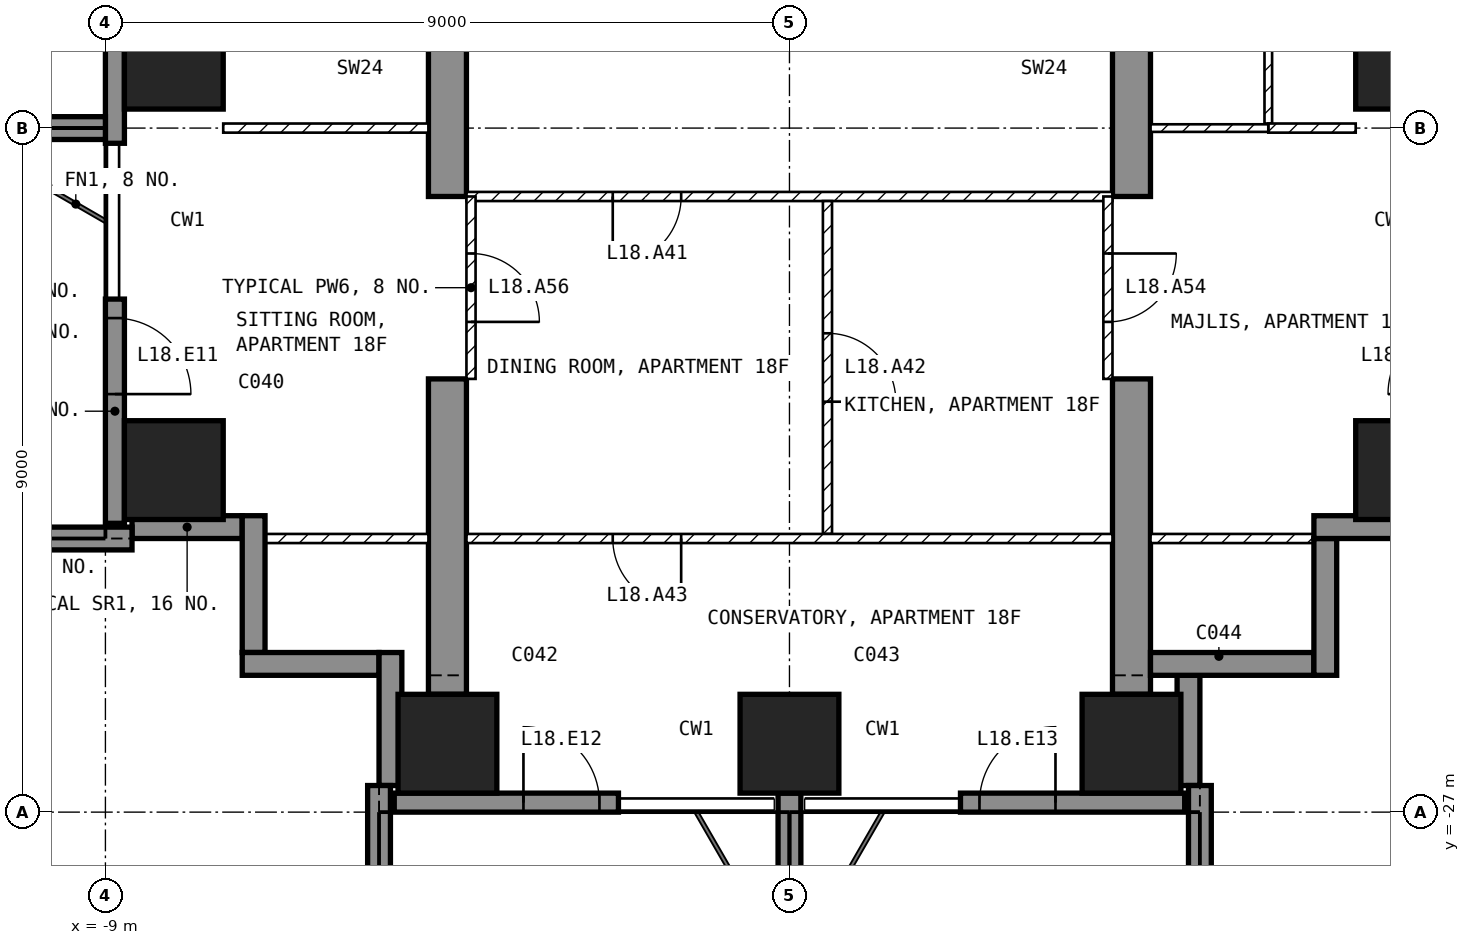
"""IFC4 building model, lengths in metres.
Left out: names, types, materials, properties, quantities, classifications, styles, units other than length and angle.
Written with IfcOpenShell. Run it as: python <this file> out.ifc"""

import sys

from ifc_helpers import new_model, si_unit, direction, frame, frame_2d, origin, origin_2d, place, context, subcontext, project, spatial, polyline, rectangle, outline, extrude, element, fill, save


model = new_model("IFC4")
c1 = context("Model", 3, precision=1e-05, world=origin(), true_north=direction((0.0, 1.0)))
c2 = subcontext(c1, "Body", "Model", "MODEL_VIEW")
j1 = project(units=[si_unit("LENGTHUNIT", "METRE"), si_unit("PLANEANGLEUNIT", "RADIAN")], contexts=[c1])
p1 = place(None, origin())
s1 = spatial("IfcSite", under=j1, at=p1, CompositionType="ELEMENT")
p2 = place(p1, origin())
s2 = spatial("IfcBuilding", under=s1, at=p2, CompositionType="ELEMENT")
p3 = place(p2, frame((0.0, 0.0, 82.0)))
s3 = spatial("IfcBuildingStorey", under=s2, at=p3, CompositionType="ELEMENT", Elevation=82.0)
for number, where, z_axis, x_axis in (
    (1, (-8.1, -22.5, -0.25), (0.0, 0.0, 1.0), (1.0, 0.0, 0.0)),
    (2, (-8.1, -17.1, -0.25), (0.0, 0.0, 1.0), (1.0, 0.0, 0.0)),
    (3, (-4.5, -26.1, -0.25), (0.0, 0.0, 1.0), (1.0, 0.0, 0.0)),
    (4, (0.0, -26.1, -0.25), (0.0, 0.0, 1.0), (1.0, 0.0, 0.0)),
    (5, (4.5, -26.1, -0.25), (0.0, 0.0, 1.0), (1.0, 0.0, 0.0)),
    (6, (8.1, -22.5, -0.25), (0.0, 0.0, 1.0), (1.0, 0.0, 0.0)),
    (7, (8.1, -17.1, -0.25), (0.0, 0.0, 1.0), (1.0, 0.0, 0.0)),
):
    element("IfcColumn", number, at=place(p3, frame(where, z_axis=z_axis, x_axis=x_axis)), inside=s3, PredefinedType="COLUMN", context=c2, shape_type="SweptSolid", body=[
        extrude(rectangle(XDim=1.3, YDim=1.3, at=origin_2d()), origin(), (0.0, 0.0, 1.0), 3.5),
    ])
for number, where, z_axis, x_axis in (
    (8, (-4.75, -25.45, -0.25), (1.0, 0.0, 0.0), (0.0, 1.0, 0.0)),
    (9, (4.25, -25.45, -0.25), (1.0, 0.0, 0.0), (0.0, 1.0, 0.0)),
):
    element("IfcWall", number, at=place(p3, frame(where, z_axis=z_axis, x_axis=x_axis)), inside=s3, PredefinedType="SHEAR", context=c2, shape_type="SweptSolid", body=[
        extrude(outline(polyline([(0.0, 0.0), (4.15, 0.0), (4.15, 2.65), (6.55, 2.65), (6.55, 0.0), (11.95, 0.0), (11.95, 2.65), (14.35, 2.65), (14.35, 0.0), (16.45, 0.0), (16.45, 3.5), (0.0, 3.5), (0.0, 0.0)])), origin(), (0.0, 0.0, 1.0), 0.5),
    ])
p4 = place(p3, frame((-8.875, -14.65, 0.0), z_axis=(0.0, 0.0, 1.0), x_axis=(0.0, -1.0, 0.0)))
e10 = element("IfcWall", 10, at=p4, inside=s3, PredefinedType="SOLIDWALL", context=c2, shape_type="SweptSolid", body=[
    extrude(rectangle(XDim=3.55, YDim=0.25, at=frame_2d((1.775, 0.0))), origin(), (0.0, 0.0, 1.0), 3.25),
])
p5 = place(p4, frame((0.25, 0.0, 0.0)))
e11 = element("IfcOpeningElement", 11, at=p5, cuts=e10, PredefinedType="OPENING", context=c2, shape_type="SweptSolid", body=[
    extrude(rectangle(XDim=1.2, YDim=2.4, at=frame_2d((0.6, 1.2))), frame((0.0, 0.135, 0.0), z_axis=(0.0, -1.0, 0.0), x_axis=(1.0, 0.0, 0.0)), (0.0, 0.0, 1.0), 0.27),
])
p6 = place(p3, frame((-8.875, -20.25, 0.0), z_axis=(0.0, 0.0, 1.0), x_axis=(0.0, -1.0, 0.0)))
e12 = element("IfcWall", 12, at=p6, inside=s3, PredefinedType="SOLIDWALL", context=c2, shape_type="SweptSolid", body=[
    extrude(rectangle(XDim=2.95, YDim=0.25, at=frame_2d((1.475, 0.0))), origin(), (0.0, 0.0, 1.0), 3.25),
])
p7 = place(p6, frame((0.25, 0.0, 0.0)))
e13 = element("IfcOpeningElement", 13, at=p7, cuts=e12, PredefinedType="OPENING", context=c2, shape_type="SweptSolid", body=[
    extrude(rectangle(XDim=1.0, YDim=2.4, at=frame_2d((0.5, 1.2))), frame((0.0, 0.135, 0.0), z_axis=(0.0, -1.0, 0.0), x_axis=(1.0, 0.0, 0.0)), (0.0, 0.0, 1.0), 0.27),
])
p8 = place(p3, frame((-5.2, -26.875, 0.0), z_axis=(0.0, 0.0, 1.0), x_axis=(1.0, 0.0, 0.0)))
e14 = element("IfcWall", 14, at=p8, inside=s3, PredefinedType="SOLIDWALL", context=c2, shape_type="SweptSolid", body=[
    extrude(rectangle(XDim=2.95, YDim=0.25, at=frame_2d((1.475, 0.0))), origin(), (0.0, 0.0, 1.0), 3.25),
])
p9 = place(p8, frame((1.7, 0.0, 0.0)))
e15 = element("IfcOpeningElement", 15, at=p9, cuts=e14, PredefinedType="OPENING", context=c2, shape_type="SweptSolid", body=[
    extrude(rectangle(XDim=1.0, YDim=2.4, at=frame_2d((0.5, 1.2))), frame((0.0, 0.135, 0.0), z_axis=(0.0, -1.0, 0.0), x_axis=(1.0, 0.0, 0.0)), (0.0, 0.0, 1.0), 0.27),
])
p10 = place(p3, frame((2.25, -26.875, 0.0), z_axis=(0.0, 0.0, 1.0), x_axis=(1.0, 0.0, 0.0)))
e16 = element("IfcWall", 16, at=p10, inside=s3, PredefinedType="SOLIDWALL", context=c2, shape_type="SweptSolid", body=[
    extrude(rectangle(XDim=2.95, YDim=0.25, at=frame_2d((1.475, 0.0))), origin(), (0.0, 0.0, 1.0), 3.25),
])
p11 = place(p10, frame((0.25, 0.0, 0.0)))
e17 = element("IfcOpeningElement", 17, at=p11, cuts=e16, PredefinedType="OPENING", context=c2, shape_type="SweptSolid", body=[
    extrude(rectangle(XDim=1.0, YDim=2.4, at=frame_2d((0.5, 1.2))), frame((0.0, 0.135, 0.0), z_axis=(0.0, -1.0, 0.0), x_axis=(1.0, 0.0, 0.0)), (0.0, 0.0, 1.0), 0.27),
])
p12 = place(p3, frame((5.25, -26.65, 0.0), z_axis=(0.0, 0.0, 1.0), x_axis=(0.0, 1.0, 0.0)))
e18 = element("IfcWall", 18, at=p12, inside=s3, PredefinedType="SOLIDWALL", context=c2, shape_type="SweptSolid", body=[
    extrude(rectangle(XDim=1.45, YDim=0.3, at=frame_2d((0.725, 0.0))), origin(), (0.0, 0.0, 1.0), 3.25),
])
p13 = place(p3, frame((4.75, -25.05, 0.0), z_axis=(0.0, 0.0, 1.0), x_axis=(1.0, 0.0, 0.0)))
e19 = element("IfcWall", 19, at=p13, inside=s3, PredefinedType="SOLIDWALL", context=c2, shape_type="SweptSolid", body=[
    extrude(rectangle(XDim=2.15, YDim=0.3, at=frame_2d((1.075, 0.0))), origin(), (0.0, 0.0, 1.0), 3.25),
])
p14 = place(p3, frame((7.05, -25.2, 0.0), z_axis=(0.0, 0.0, 1.0), x_axis=(0.0, 1.0, 0.0)))
e20 = element("IfcWall", 20, at=p14, inside=s3, PredefinedType="SOLIDWALL", context=c2, shape_type="SweptSolid", body=[
    extrude(rectangle(XDim=1.8, YDim=0.3, at=frame_2d((0.9, 0.0))), origin(), (0.0, 0.0, 1.0), 3.25),
])
p15 = place(p3, frame((6.9, -23.25, 0.0), z_axis=(0.0, 0.0, 1.0), x_axis=(1.0, 0.0, 0.0)))
e21 = element("IfcWall", 21, at=p15, inside=s3, PredefinedType="SOLIDWALL", context=c2, shape_type="SweptSolid", body=[
    extrude(rectangle(XDim=1.75, YDim=0.3, at=frame_2d((0.875, 0.0))), origin(), (0.0, 0.0, 1.0), 3.25),
])
p16 = place(p3, frame((-8.65, -23.25, 0.0), z_axis=(0.0, 0.0, 1.0), x_axis=(1.0, 0.0, 0.0)))
e22 = element("IfcWall", 22, at=p16, inside=s3, PredefinedType="SOLIDWALL", context=c2, shape_type="SweptSolid", body=[
    extrude(rectangle(XDim=1.45, YDim=0.3, at=frame_2d((0.725, 0.0))), origin(), (0.0, 0.0, 1.0), 3.25),
])
p17 = place(p3, frame((-7.05, -23.1, 0.0), z_axis=(0.0, 0.0, 1.0), x_axis=(0.0, -1.0, 0.0)))
e23 = element("IfcWall", 23, at=p17, inside=s3, PredefinedType="SOLIDWALL", context=c2, shape_type="SweptSolid", body=[
    extrude(rectangle(XDim=1.8, YDim=0.3, at=frame_2d((0.9, 0.0))), origin(), (0.0, 0.0, 1.0), 3.25),
])
p18 = place(p3, frame((-7.2, -25.05, 0.0), z_axis=(0.0, 0.0, 1.0), x_axis=(1.0, 0.0, 0.0)))
e24 = element("IfcWall", 24, at=p18, inside=s3, PredefinedType="SOLIDWALL", context=c2, shape_type="SweptSolid", body=[
    extrude(rectangle(XDim=1.8, YDim=0.3, at=frame_2d((0.9, 0.0))), origin(), (0.0, 0.0, 1.0), 3.25),
])
p19 = place(p3, frame((-5.25, -24.9, 0.0), z_axis=(0.0, 0.0, 1.0), x_axis=(0.0, -1.0, 0.0)))
e25 = element("IfcWall", 25, at=p19, inside=s3, PredefinedType="SOLIDWALL", context=c2, shape_type="SweptSolid", body=[
    extrude(rectangle(XDim=1.75, YDim=0.3, at=frame_2d((0.875, 0.0))), origin(), (0.0, 0.0, 1.0), 3.25),
])
p20 = place(p3, frame((-8.65, -23.4, 0.0), z_axis=(0.0, 0.0, 1.0), x_axis=(-1.0, 0.0, 0.0)))
e26 = element("IfcWall", 26, at=p20, inside=s3, PredefinedType="SOLIDWALL", context=c2, shape_type="SweptSolid", body=[
    extrude(rectangle(XDim=3.05, YDim=0.3, at=frame_2d((1.525, 0.0))), origin(), (0.0, 0.0, 1.0), 3.25),
])
p21 = place(p3, frame((-9.0, -18.0, 0.0), z_axis=(0.0, 0.0, 1.0), x_axis=(-1.0, 0.0, 0.0)))
e27 = element("IfcWall", 27, at=p21, inside=s3, PredefinedType="SOLIDWALL", context=c2, shape_type="SweptSolid", body=[
    extrude(rectangle(XDim=2.7, YDim=0.3, at=frame_2d((1.35, 0.0))), origin(), (0.0, 0.0, 1.0), 3.25),
])
p22 = place(p3, frame((-5.4, -26.65, 0.0), z_axis=(0.0, 0.0, 1.0), x_axis=(0.0, -1.0, 0.0)))
e28 = element("IfcWall", 28, at=p22, inside=s3, PredefinedType="SOLIDWALL", context=c2, shape_type="SweptSolid", body=[
    extrude(rectangle(XDim=3.05, YDim=0.3, at=frame_2d((1.525, 0.0))), origin(), (0.0, 0.0, 1.0), 3.25),
])
p23 = place(p3, frame((0.0, -26.75, 0.0), z_axis=(0.0, 0.0, 1.0), x_axis=(0.0, -1.0, 0.0)))
e29 = element("IfcWall", 29, at=p23, inside=s3, PredefinedType="SOLIDWALL", context=c2, shape_type="SweptSolid", body=[
    extrude(rectangle(XDim=2.95, YDim=0.3, at=frame_2d((1.475, 0.0))), origin(), (0.0, 0.0, 1.0), 3.25),
])
p24 = place(p3, frame((5.4, -26.65, 0.0), z_axis=(0.0, 0.0, 1.0), x_axis=(0.0, -1.0, 0.0)))
e30 = element("IfcWall", 30, at=p24, inside=s3, PredefinedType="SOLIDWALL", context=c2, shape_type="SweptSolid", body=[
    extrude(rectangle(XDim=3.05, YDim=0.3, at=frame_2d((1.525, 0.0))), origin(), (0.0, 0.0, 1.0), 3.25),
])
p25 = place(p3, frame((4.25, -18.9, 0.0), z_axis=(0.0, 0.0, 1.0), x_axis=(-1.0, 0.0, 0.0)))
e31 = element("IfcWall", 31, at=p25, inside=s3, PredefinedType="PARTITIONING", context=c2, shape_type="SweptSolid", body=[
    extrude(rectangle(XDim=8.5, YDim=0.12, at=frame_2d((4.25, 0.0))), origin(), (0.0, 0.0, 1.0), 3.25),
])
p26 = place(p25, frame((5.675, 0.0, 0.0)))
e32 = element("IfcOpeningElement", 32, at=p26, cuts=e31, PredefinedType="OPENING", context=c2, shape_type="SweptSolid", body=[
    extrude(rectangle(XDim=0.9, YDim=2.1, at=frame_2d((0.45, 1.05))), frame((0.0, 0.07, 0.0), z_axis=(0.0, -1.0, 0.0), x_axis=(1.0, 0.0, 0.0)), (0.0, 0.0, 1.0), 0.14),
])
p27 = place(p3, frame((0.5, -18.96, 0.0), z_axis=(0.0, 0.0, 1.0), x_axis=(0.0, -1.0, 0.0)))
e33 = element("IfcWall", 33, at=p27, inside=s3, PredefinedType="PARTITIONING", context=c2, shape_type="SweptSolid", body=[
    extrude(rectangle(XDim=4.38, YDim=0.12, at=frame_2d((2.19, 0.0))), origin(), (0.0, 0.0, 1.0), 3.25),
])
p28 = place(p27, frame((1.74, 0.0, 0.0)))
e34 = element("IfcOpeningElement", 34, at=p28, cuts=e33, PredefinedType="OPENING", context=c2, shape_type="SweptSolid", body=[
    extrude(rectangle(XDim=0.9, YDim=2.1, at=frame_2d((0.45, 1.05))), frame((0.0, 0.07, 0.0), z_axis=(0.0, -1.0, 0.0), x_axis=(1.0, 0.0, 0.0)), (0.0, 0.0, 1.0), 0.14),
])
p29 = place(p3, frame((4.25, -23.4, 0.0), z_axis=(0.0, 0.0, 1.0), x_axis=(-1.0, 0.0, 0.0)))
e35 = element("IfcWall", 35, at=p29, inside=s3, PredefinedType="PARTITIONING", context=c2, shape_type="SweptSolid", body=[
    extrude(rectangle(XDim=8.5, YDim=0.12, at=frame_2d((4.25, 0.0))), origin(), (0.0, 0.0, 1.0), 3.25),
])
p30 = place(p29, frame((5.675, 0.0, 0.0)))
e36 = element("IfcOpeningElement", 36, at=p30, cuts=e35, PredefinedType="OPENING", context=c2, shape_type="SweptSolid", body=[
    extrude(rectangle(XDim=0.9, YDim=2.1, at=frame_2d((0.45, 1.05))), frame((0.0, 0.07, 0.0), z_axis=(0.0, -1.0, 0.0), x_axis=(1.0, 0.0, 0.0)), (0.0, 0.0, 1.0), 0.14),
])
p31 = place(p3, frame((6.3, -17.94, 0.0), z_axis=(0.0, 0.0, 1.0), x_axis=(0.0, 1.0, 0.0)))
e37 = element("IfcWall", 37, at=p31, inside=s3, PredefinedType="PARTITIONING", context=c2, shape_type="SweptSolid", body=[
    extrude(rectangle(XDim=3.49, YDim=0.1, at=frame_2d((1.745, 0.0))), origin(), (0.0, 0.0, 1.0), 3.25),
])
p32 = place(p31, frame((1.87, 0.0, 0.0)))
e38 = element("IfcOpeningElement", 38, at=p32, cuts=e37, PredefinedType="OPENING", context=c2, shape_type="SweptSolid", body=[
    extrude(rectangle(XDim=0.85, YDim=2.1, at=frame_2d((0.425, 1.05))), frame((0.0, 0.06, 0.0), z_axis=(0.0, -1.0, 0.0), x_axis=(1.0, 0.0, 0.0)), (0.0, 0.0, 1.0), 0.12),
])
p33 = place(p3, frame((7.45, -18.0, 0.0), z_axis=(0.0, 0.0, 1.0), x_axis=(-1.0, 0.0, 0.0)))
e39 = element("IfcWall", 39, at=p33, inside=s3, PredefinedType="PARTITIONING", context=c2, shape_type="SweptSolid", body=[
    extrude(rectangle(XDim=1.15, YDim=0.12, at=frame_2d((0.575, 0.0))), origin(), (0.0, 0.0, 1.0), 3.25),
])
p34 = place(p3, frame((6.3, -18.0, 0.0), z_axis=(0.0, 0.0, 1.0), x_axis=(-1.0, 0.0, 0.0)))
e40 = element("IfcWall", 40, at=p34, inside=s3, PredefinedType="PARTITIONING", context=c2, shape_type="SweptSolid", body=[
    extrude(rectangle(XDim=1.55, YDim=0.1, at=frame_2d((0.775, 0.0))), origin(), (0.0, 0.0, 1.0), 3.25),
])
p35 = place(p3, frame((7.12, -23.4, 0.0), z_axis=(0.0, 0.0, 1.0), x_axis=(-1.0, 0.0, 0.0)))
e41 = element("IfcWall", 41, at=p35, inside=s3, PredefinedType="PARTITIONING", context=c2, shape_type="SweptSolid", body=[
    extrude(rectangle(XDim=2.37, YDim=0.12, at=frame_2d((1.185, 0.0))), origin(), (0.0, 0.0, 1.0), 3.25),
])
p36 = place(p3, frame((-4.75, -18.0, 0.0), z_axis=(0.0, 0.0, 1.0), x_axis=(-1.0, 0.0, 0.0)))
e42 = element("IfcWall", 42, at=p36, inside=s3, PredefinedType="PARTITIONING", context=c2, shape_type="SweptSolid", body=[
    extrude(rectangle(XDim=2.7, YDim=0.12, at=frame_2d((1.35, 0.0))), origin(), (0.0, 0.0, 1.0), 3.25),
])
p37 = place(p3, frame((-4.75, -23.4, 0.0), z_axis=(0.0, 0.0, 1.0), x_axis=(-1.0, 0.0, 0.0)))
e43 = element("IfcWall", 43, at=p37, inside=s3, PredefinedType="PARTITIONING", context=c2, shape_type="SweptSolid", body=[
    extrude(rectangle(XDim=2.37, YDim=0.12, at=frame_2d((1.185, 0.0))), origin(), (0.0, 0.0, 1.0), 3.25),
])
p38 = place(p3, frame((4.19, -18.9, 0.0), z_axis=(0.0, 0.0, 1.0), x_axis=(0.0, -1.0, 0.0)))
e44 = element("IfcWall", 44, at=p38, inside=s3, PredefinedType="PARTITIONING", context=c2, shape_type="SweptSolid", body=[
    extrude(rectangle(XDim=2.4, YDim=0.12, at=frame_2d((1.2, 0.0))), origin(), (0.0, 0.0, 1.0), 2.4),
])
p39 = place(p38, frame((0.75, 0.0, 0.0)))
e45 = element("IfcOpeningElement", 45, at=p39, cuts=e44, PredefinedType="OPENING", context=c2, shape_type="SweptSolid", body=[
    extrude(rectangle(XDim=0.9, YDim=2.1, at=frame_2d((0.45, 1.05))), frame((0.0, 0.07, 0.0), z_axis=(0.0, -1.0, 0.0), x_axis=(1.0, 0.0, 0.0)), (0.0, 0.0, 1.0), 0.14),
])
p40 = place(p3, frame((-4.19, -18.9, 0.0), z_axis=(0.0, 0.0, 1.0), x_axis=(0.0, -1.0, 0.0)))
e46 = element("IfcWall", 46, at=p40, inside=s3, PredefinedType="PARTITIONING", context=c2, shape_type="SweptSolid", body=[
    extrude(rectangle(XDim=2.4, YDim=0.12, at=frame_2d((1.2, 0.0))), origin(), (0.0, 0.0, 1.0), 2.4),
])
p41 = place(p40, frame((0.75, 0.0, 0.0)))
e47 = element("IfcOpeningElement", 47, at=p41, cuts=e46, PredefinedType="OPENING", context=c2, shape_type="SweptSolid", body=[
    extrude(rectangle(XDim=0.9, YDim=2.1, at=frame_2d((0.45, 1.05))), frame((0.0, 0.07, 0.0), z_axis=(0.0, -1.0, 0.0), x_axis=(1.0, 0.0, 0.0)), (0.0, 0.0, 1.0), 0.14),
])
p42 = place(p7, origin())
e48 = element("IfcDoor", 48, at=p42, inside=s3, OperationType="SINGLE_SWING_RIGHT", PredefinedType="DOOR", context=c2, shape_type="SweptSolid", body=[
    extrude(rectangle(XDim=1.0, YDim=2.4, at=frame_2d((0.5, 1.2))), frame((0.0, 0.025, 0.0), z_axis=(0.0, -1.0, 0.0), x_axis=(1.0, 0.0, 0.0)), (0.0, 0.0, 1.0), 0.05),
])
fill(e13, e48)
p43 = place(p9, origin())
e49 = element("IfcDoor", 49, at=p43, inside=s3, OperationType="SINGLE_SWING_LEFT", PredefinedType="DOOR", context=c2, shape_type="SweptSolid", body=[
    extrude(rectangle(XDim=1.0, YDim=2.4, at=frame_2d((0.5, 1.2))), frame((0.0, 0.025, 0.0), z_axis=(0.0, -1.0, 0.0), x_axis=(1.0, 0.0, 0.0)), (0.0, 0.0, 1.0), 0.05),
])
fill(e15, e49)
p44 = place(p11, origin())
e50 = element("IfcDoor", 50, at=p44, inside=s3, OperationType="SINGLE_SWING_RIGHT", PredefinedType="DOOR", context=c2, shape_type="SweptSolid", body=[
    extrude(rectangle(XDim=1.0, YDim=2.4, at=frame_2d((0.5, 1.2))), frame((0.0, 0.025, 0.0), z_axis=(0.0, -1.0, 0.0), x_axis=(1.0, 0.0, 0.0)), (0.0, 0.0, 1.0), 0.05),
])
fill(e17, e50)
p45 = place(p26, origin())
e51 = element("IfcDoor", 51, at=p45, inside=s3, OperationType="SINGLE_SWING_RIGHT", PredefinedType="DOOR", context=c2, shape_type="SweptSolid", body=[
    extrude(rectangle(XDim=0.9, YDim=2.1, at=frame_2d((0.45, 1.05))), frame((0.0, 0.025, 0.0), z_axis=(0.0, -1.0, 0.0), x_axis=(1.0, 0.0, 0.0)), (0.0, 0.0, 1.0), 0.05),
])
fill(e32, e51)
p46 = place(p28, origin())
e52 = element("IfcDoor", 52, at=p46, inside=s3, OperationType="SINGLE_SWING_RIGHT", PredefinedType="DOOR", context=c2, shape_type="SweptSolid", body=[
    extrude(rectangle(XDim=0.9, YDim=2.1, at=frame_2d((0.45, 1.05))), frame((0.0, 0.025, 0.0), z_axis=(0.0, -1.0, 0.0), x_axis=(1.0, 0.0, 0.0)), (0.0, 0.0, 1.0), 0.05),
])
fill(e34, e52)
p47 = place(p30, origin())
e53 = element("IfcDoor", 53, at=p47, inside=s3, OperationType="SINGLE_SWING_LEFT", PredefinedType="DOOR", context=c2, shape_type="SweptSolid", body=[
    extrude(rectangle(XDim=0.9, YDim=2.1, at=frame_2d((0.45, 1.05))), frame((0.0, 0.025, 0.0), z_axis=(0.0, -1.0, 0.0), x_axis=(1.0, 0.0, 0.0)), (0.0, 0.0, 1.0), 0.05),
])
fill(e36, e53)
p48 = place(p39, origin())
e54 = element("IfcDoor", 54, at=p48, inside=s3, OperationType="SINGLE_SWING_LEFT", PredefinedType="DOOR", context=c2, shape_type="SweptSolid", body=[
    extrude(rectangle(XDim=0.9, YDim=2.1, at=frame_2d((0.45, 1.05))), frame((0.0, 0.025, 0.0), z_axis=(0.0, -1.0, 0.0), x_axis=(1.0, 0.0, 0.0)), (0.0, 0.0, 1.0), 0.05),
])
fill(e45, e54)
p49 = place(p41, origin())
e55 = element("IfcDoor", 55, at=p49, inside=s3, OperationType="SINGLE_SWING_RIGHT", PredefinedType="DOOR", context=c2, shape_type="SweptSolid", body=[
    extrude(rectangle(XDim=0.9, YDim=2.1, at=frame_2d((0.45, 1.05))), frame((0.0, 0.025, 0.0), z_axis=(0.0, -1.0, 0.0), x_axis=(1.0, 0.0, 0.0)), (0.0, 0.0, 1.0), 0.05),
])
fill(e47, e55)
save(model, sys.argv[1])
